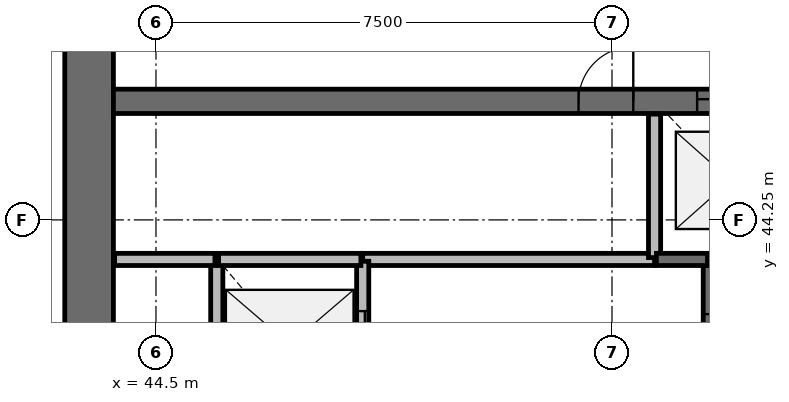
"""IFC4 building model, lengths in metres.
Left out: names, types, materials, properties, quantities, classifications, styles, units other than length and angle.
Written with IfcOpenShell. Run it as: python <this file> out.ifc"""

import sys

from ifc_helpers import new_model, si_unit, direction, frame, frame_2d, origin, place, context, subcontext, project, spatial, rectangle, extrude, source, transform, mapped, element, fill, save


model = new_model("IFC4")
c1 = context("Model", 3, precision=1e-05, world=origin(), true_north=direction((0.0, 1.0)))
c2 = subcontext(c1, "Body", "Model", "MODEL_VIEW")
j1 = project(units=[si_unit("LENGTHUNIT", "METRE"), si_unit("PLANEANGLEUNIT", "RADIAN")], contexts=[c1])
p1 = place(None, origin())
s1 = spatial("IfcSite", under=j1, at=p1, CompositionType="ELEMENT")
p2 = place(p1, origin())
s2 = spatial("IfcBuilding", under=s1, at=p2, CompositionType="ELEMENT")
p3 = place(p2, frame((0.0, 0.0, 140.9)))
s3 = spatial("IfcBuildingStorey", under=s2, at=p3, CompositionType="ELEMENT", Elevation=140.9)
p4 = place(p3, frame((43.4, 56.0, 0.0), z_axis=(0.0, 0.0, 1.0), x_axis=(0.0, -1.0, 0.0)))
e1 = element("IfcWall", 1, at=p4, inside=s3, PredefinedType="SHEAR", context=c2, shape_type="SweptSolid", body=[
    extrude(rectangle(XDim=16.0, YDim=0.8, at=frame_2d((8.0, 0.0))), origin(), (0.0, 0.0, 1.0), 3.9),
])
p5 = place(p4, frame((7.1, 0.0, 0.0)))
e2 = element("IfcOpeningElement", 2, at=p5, cuts=e1, PredefinedType="OPENING", context=c2, shape_type="SweptSolid", body=[
    extrude(rectangle(XDim=1.8, YDim=2.1, at=frame_2d((0.9, 1.05))), frame((0.0, 0.41, 0.0), z_axis=(0.0, -1.0, 0.0), x_axis=(1.0, 0.0, 0.0)), (0.0, 0.0, 1.0), 0.82),
])
p6 = place(p3, frame((43.8, 46.2, 0.0), z_axis=(0.0, 0.0, 1.0), x_axis=(1.0, 0.0, 0.0)))
e3 = element("IfcWall", 3, at=p6, inside=s3, PredefinedType="SHEAR", context=c2, shape_type="SweptSolid", body=[
    extrude(rectangle(XDim=16.4, YDim=0.4, at=frame_2d((8.2, 0.0))), origin(), (0.0, 0.0, 1.0), 3.9),
])
p7 = place(p6, frame((9.6, 0.0, 0.0)))
e4 = element("IfcOpeningElement", 4, at=p7, cuts=e3, PredefinedType="OPENING", context=c2, shape_type="SweptSolid", body=[
    extrude(rectangle(XDim=1.1, YDim=2.1, at=frame_2d((0.55, 1.05))), frame((0.0, 0.21, 0.0), z_axis=(0.0, -1.0, 0.0), x_axis=(1.0, 0.0, 0.0)), (0.0, 0.0, 1.0), 0.42),
])
p8 = place(p6, frame((12.1, 0.0, 0.0)))
e5 = element("IfcOpeningElement", 5, at=p8, cuts=e3, PredefinedType="OPENING", context=c2, shape_type="SweptSolid", body=[
    extrude(rectangle(XDim=1.1, YDim=2.1, at=frame_2d((0.55, 1.05))), frame((0.0, 0.21, 0.0), z_axis=(0.0, -1.0, 0.0), x_axis=(1.0, 0.0, 0.0)), (0.0, 0.0, 1.0), 0.42),
])
p9 = place(p6, frame((14.6, 0.0, 0.0)))
e6 = element("IfcOpeningElement", 6, at=p9, cuts=e3, PredefinedType="OPENING", context=c2, shape_type="SweptSolid", body=[
    extrude(rectangle(XDim=1.1, YDim=2.1, at=frame_2d((0.55, 1.05))), frame((0.0, 0.21, 0.0), z_axis=(0.0, -1.0, 0.0), x_axis=(1.0, 0.0, 0.0)), (0.0, 0.0, 1.0), 0.42),
])
p10 = place(p6, frame((7.65, 0.0, 0.0)))
e7 = element("IfcOpeningElement", 7, at=p10, cuts=e3, PredefinedType="OPENING", context=c2, shape_type="SweptSolid", body=[
    extrude(rectangle(XDim=0.9, YDim=2.1, at=frame_2d((0.45, 1.05))), frame((0.0, 0.21, 0.0), z_axis=(0.0, -1.0, 0.0), x_axis=(1.0, 0.0, 0.0)), (0.0, 0.0, 1.0), 0.42),
])
p11 = place(p3, frame((52.7, 43.6, 0.0), z_axis=(0.0, 0.0, 1.0), x_axis=(-1.0, 0.0, 0.0)))
e8 = element("IfcWall", 8, at=p11, inside=s3, PredefinedType="SOLIDWALL", context=c2, shape_type="SweptSolid", body=[
    extrude(rectangle(XDim=4.8, YDim=0.2, at=frame_2d((2.4, 0.0))), origin(), (0.0, 0.0, 1.0), 3.58),
])
p12 = place(p3, frame((45.5, 43.6, 0.0), z_axis=(0.0, 0.0, 1.0), x_axis=(0.0, -1.0, 0.0)))
e9 = element("IfcWall", 9, at=p12, inside=s3, PredefinedType="SOLIDWALL", context=c2, shape_type="SweptSolid", body=[
    extrude(rectangle(XDim=2.78, YDim=0.2, at=frame_2d((1.39, 0.0))), origin(), (0.0, 0.0, 1.0), 3.58),
])
p13 = place(p3, frame((47.9, 40.82, 0.0), z_axis=(0.0, 0.0, 1.0), x_axis=(0.0, 1.0, 0.0)))
e10 = element("IfcWall", 10, at=p13, inside=s3, PredefinedType="SOLIDWALL", context=c2, shape_type="SweptSolid", body=[
    extrude(rectangle(XDim=2.75, YDim=0.2, at=frame_2d((1.375, 0.0))), origin(), (0.0, 0.0, 1.0), 3.58),
])
p14 = place(p13, frame((0.83, 0.0, 0.0)))
e11 = element("IfcOpeningElement", 11, at=p14, cuts=e10, PredefinedType="OPENING", context=c2, shape_type="SweptSolid", body=[
    extrude(rectangle(XDim=1.1, YDim=2.1, at=frame_2d((0.55, 1.05))), frame((0.0, 0.11, 0.0), z_axis=(0.0, -1.0, 0.0), x_axis=(1.0, 0.0, 0.0)), (0.0, 0.0, 1.0), 0.22),
])
p15 = place(p3, frame((53.6, 43.6, 0.0), z_axis=(0.0, 0.0, 1.0), x_axis=(0.0, -1.0, 0.0)))
e12 = element("IfcWall", 12, at=p15, inside=s3, PredefinedType="SOLIDWALL", context=c2, shape_type="SweptSolid", body=[
    extrude(rectangle(XDim=2.78, YDim=0.2, at=frame_2d((1.39, 0.0))), origin(), (0.0, 0.0, 1.0), 3.58),
])
p16 = place(p15, frame((0.9, 0.0, 0.0)))
e13 = element("IfcOpeningElement", 13, at=p16, cuts=e12, PredefinedType="OPENING", context=c2, shape_type="SweptSolid", body=[
    extrude(rectangle(XDim=1.0, YDim=2.1, at=frame_2d((0.5, 1.05))), frame((0.0, 0.11, 0.0), z_axis=(0.0, -1.0, 0.0), x_axis=(1.0, 0.0, 0.0)), (0.0, 0.0, 1.0), 0.22),
])
p17 = place(p3, frame((47.87, 43.6, 0.0), z_axis=(0.0, 0.0, 1.0), x_axis=(-1.0, 0.0, 0.0)))
e14 = element("IfcWall", 14, at=p17, inside=s3, PredefinedType="SOLIDWALL", context=c2, shape_type="SweptSolid", body=[
    extrude(rectangle(XDim=2.34, YDim=0.2, at=frame_2d((1.17, 0.0))), origin(), (0.0, 0.0, 1.0), 3.58),
])
p18 = place(p3, frame((52.7, 45.99, 0.0), z_axis=(0.0, 0.0, 1.0), x_axis=(0.0, -1.0, 0.0)))
e15 = element("IfcWall", 15, at=p18, inside=s3, PredefinedType="SOLIDWALL", context=c2, shape_type="SweptSolid", body=[
    extrude(rectangle(XDim=2.36, YDim=0.2, at=frame_2d((1.18, 0.0))), origin(), (0.0, 0.0, 1.0), 3.58),
])
p19 = place(p3, frame((45.47, 43.6, 0.0), z_axis=(0.0, 0.0, 1.0), x_axis=(-1.0, 0.0, 0.0)))
e16 = element("IfcWall", 16, at=p19, inside=s3, PredefinedType="SOLIDWALL", context=c2, shape_type="SweptSolid", body=[
    extrude(rectangle(XDim=1.65, YDim=0.2, at=frame_2d((0.825, 0.0))), origin(), (0.0, 0.0, 1.0), 3.58),
])
p20 = place(p3, frame((52.73, 43.6, 0.0), z_axis=(0.0, 0.0, 1.0), x_axis=(1.0, 0.0, 0.0)))
e17 = element("IfcWall", 17, at=p20, inside=s3, PredefinedType="SOLIDWALL", context=c2, shape_type="SweptSolid", body=[
    extrude(rectangle(XDim=0.84, YDim=0.2, at=frame_2d((0.42, 0.0))), origin(), (0.0, 0.0, 1.0), 3.58),
])
m1 = source(origin(), c2, "Body", "SweptSolid", [
    extrude(rectangle(XDim=1.1, YDim=2.1, at=frame_2d((0.55, 1.05))), frame((0.0, 0.025, 0.0), z_axis=(0.0, -1.0, 0.0), x_axis=(1.0, 0.0, 0.0)), (0.0, 0.0, 1.0), 0.05),
])
p21 = place(p7, origin())
e18 = element("IfcDoor", 18, at=p21, inside=s3, OperationType="DOUBLE_DOOR_SLIDING", PredefinedType="USERDEFINED", context=c2, shape_type="MappedRepresentation", body=[
    mapped(m1, transform((0.0, 0.0, 0.0), scale=1.0)),
])
fill(e4, e18)
p22 = place(p14, origin())
e19 = element("IfcDoor", 19, at=p22, inside=s3, OperationType="DOUBLE_DOOR_SLIDING", PredefinedType="USERDEFINED", context=c2, shape_type="MappedRepresentation", body=[
    mapped(m1, transform((0.0, 0.0, 0.0), scale=1.0)),
])
fill(e11, e19)
m2 = source(origin(), c2, "Body", "SweptSolid", [
    extrude(rectangle(XDim=1.0, YDim=2.1, at=frame_2d((0.5, 1.05))), frame((0.0, 0.025, 0.0), z_axis=(0.0, -1.0, 0.0), x_axis=(1.0, 0.0, 0.0)), (0.0, 0.0, 1.0), 0.05),
])
p23 = place(p16, origin())
e20 = element("IfcDoor", 20, at=p23, inside=s3, OperationType="SINGLE_SWING_LEFT", PredefinedType="DOOR", context=c2, shape_type="MappedRepresentation", body=[
    mapped(m2, transform((0.0, 0.0, 0.0), scale=1.0)),
])
fill(e13, e20)
m3 = source(origin(), c2, "Body", "SweptSolid", [
    extrude(rectangle(XDim=0.9, YDim=2.1, at=frame_2d((0.45, 1.05))), frame((0.0, 0.025, 0.0), z_axis=(0.0, -1.0, 0.0), x_axis=(1.0, 0.0, 0.0)), (0.0, 0.0, 1.0), 0.05),
])
p24 = place(p10, origin())
e21 = element("IfcDoor", 21, at=p24, inside=s3, OperationType="SINGLE_SWING_RIGHT", PredefinedType="DOOR", context=c2, shape_type="MappedRepresentation", body=[
    mapped(m3, transform((0.0, 0.0, 0.0), scale=1.0)),
])
fill(e7, e21)
save(model, sys.argv[1])
